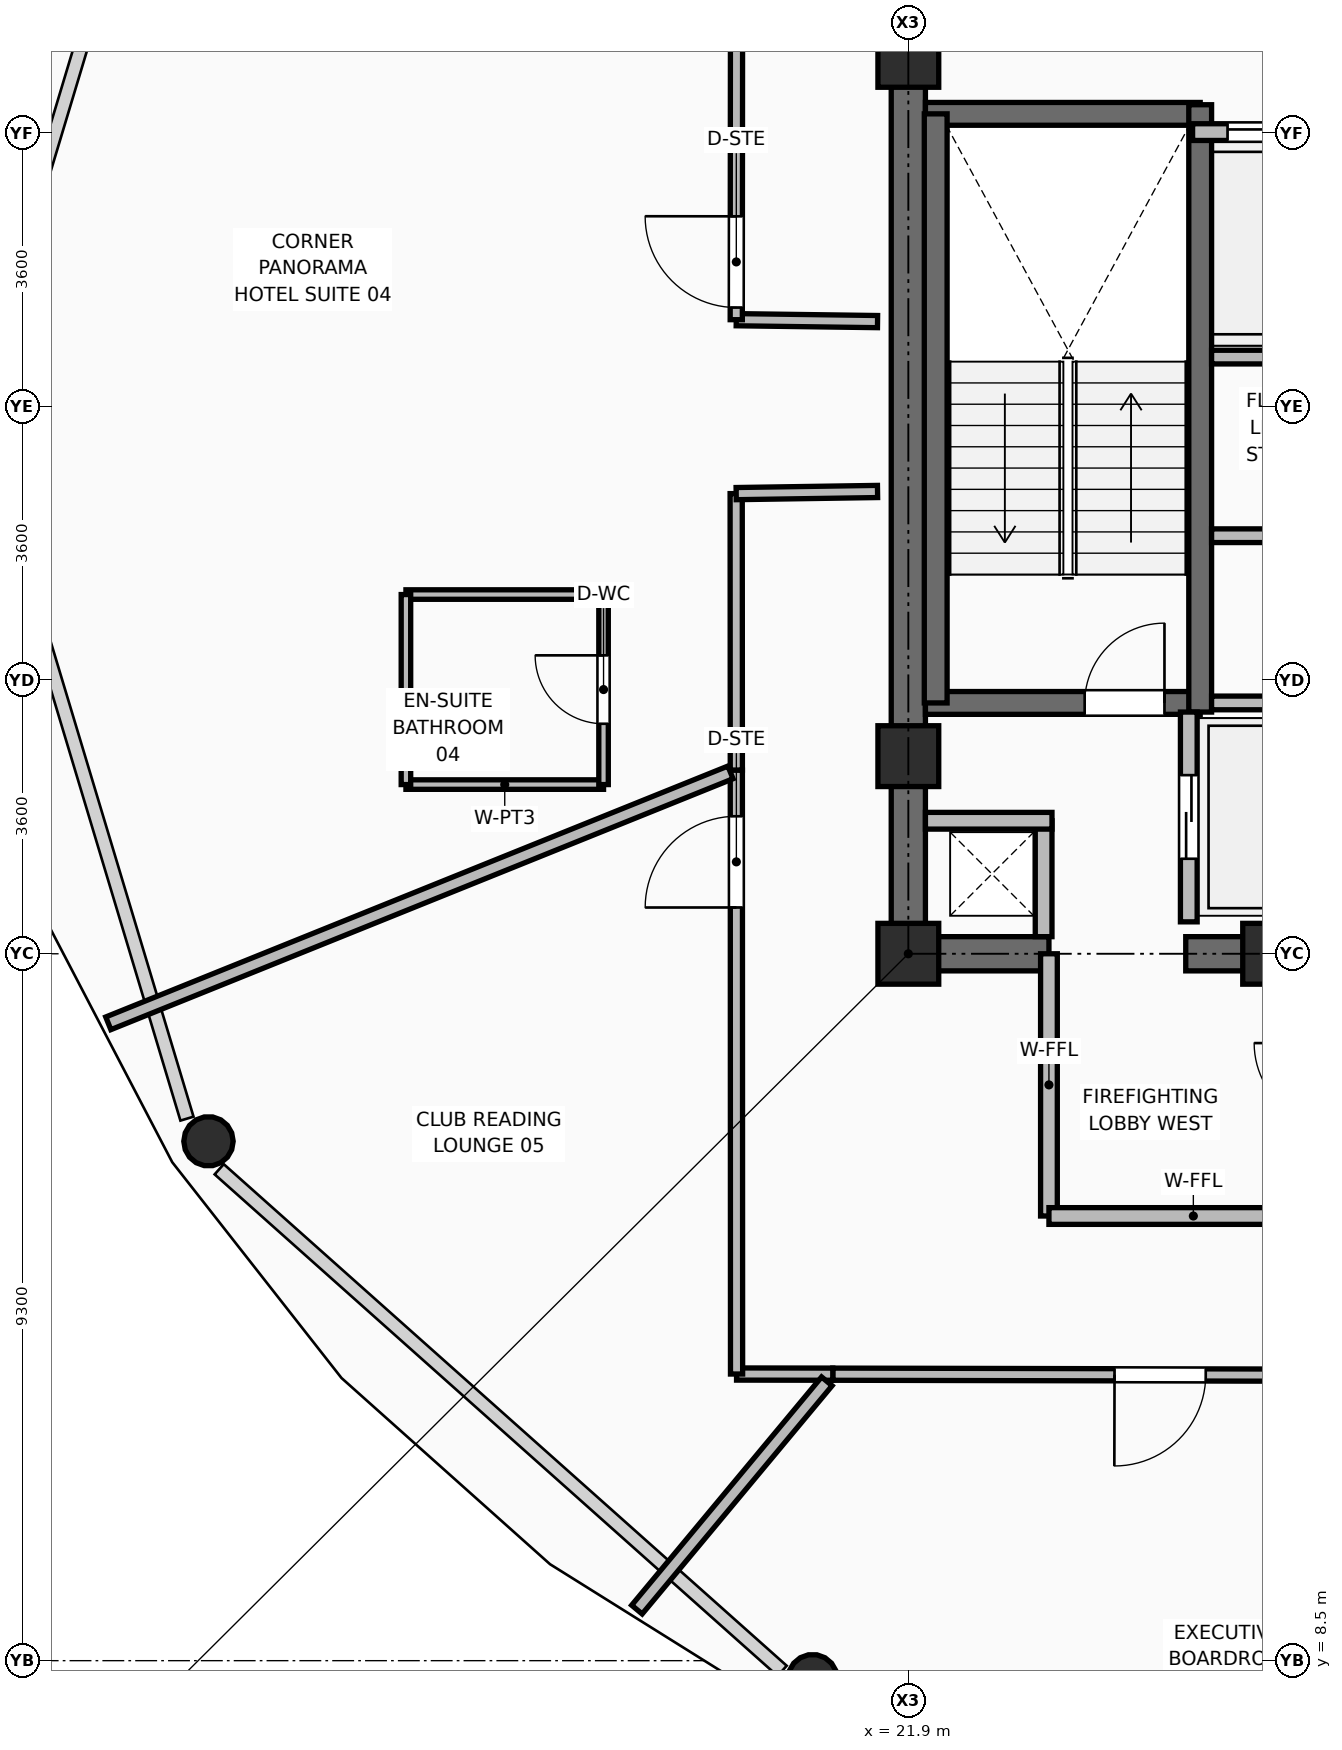
"""IFC4 building model, lengths in metres.
Left out: names, types, materials, properties, quantities, classifications, styles, units other than length and angle.
Written with IfcOpenShell. Run it as: python <this file> out.ifc"""

import sys

from ifc_helpers import new_model, si_unit, direction, frame, frame_2d, origin, origin_2d, place, context, subcontext, project, spatial, rectangle, hollow_circle, extrude, element, fill, save


model = new_model("IFC4")
c1 = context("Model", 3, precision=1e-05, world=origin(), true_north=direction((0.0, 1.0)))
c2 = subcontext(c1, "Body", "Model", "MODEL_VIEW")
j1 = project(units=[si_unit("LENGTHUNIT", "METRE"), si_unit("PLANEANGLEUNIT", "RADIAN")], contexts=[c1])
p1 = place(None, origin())
s1 = spatial("IfcSite", under=j1, at=p1, CompositionType="ELEMENT")
p2 = place(p1, origin())
s2 = spatial("IfcBuilding", under=s1, at=p2, CompositionType="ELEMENT")
p3 = place(p2, frame((0.0, 0.0, 242.4)))
s3 = spatial("IfcBuildingStorey", under=s2, at=p3, CompositionType="ELEMENT", Elevation=242.4)
for number, where, z_axis, x_axis in (
    (1, (21.9, 17.8, 0.0), (0.0, 0.0, 1.0), (1.0, 0.0, 0.0)),
    (2, (26.7, 17.8, 0.0), (0.0, 0.0, 1.0), (1.0, 0.0, 0.0)),
    (3, (21.9, 20.4, 0.0), (0.0, 0.0, 1.0), (1.0, 0.0, 0.0)),
    (4, (21.9, 29.6, 0.0), (0.0, 0.0, 1.0), (1.0, 0.0, 0.0)),
):
    element("IfcColumn", number, at=place(p3, frame(where, z_axis=z_axis, x_axis=x_axis)), inside=s3, PredefinedType="COLUMN", context=c2, shape_type="SweptSolid", body=[
        extrude(rectangle(XDim=0.8, YDim=0.8, at=origin_2d()), origin(), (0.0, 0.0, 1.0), 3.75),
    ])
for number, where, z_axis, x_axis in (
    (5, (12.692, 15.333, 0.0), (0.0, 0.0, 1.0), (1.0, 0.0, 0.0)),
    (6, (20.641, 8.257, 0.0), (0.0, 0.0, 1.0), (1.0, 0.0, 0.0)),
):
    element("IfcColumn", number, at=place(p3, frame(where, z_axis=z_axis, x_axis=x_axis)), inside=s3, PredefinedType="COLUMN", context=c2, shape_type="SweptSolid", body=[
        extrude(hollow_circle(Radius=0.325, WallThickness=0.03, at=origin_2d()), origin(), (0.0, 0.0, 1.0), 3.57),
    ])
p4 = place(p3, frame((21.675, 17.8, 0.0), z_axis=(0.0, 0.0, 1.0), x_axis=(1.0, 0.0, 0.0)))
e7 = element("IfcWall", 7, at=p4, inside=s3, PredefinedType="SHEAR", context=c2, shape_type="SweptSolid", body=[
    extrude(rectangle(XDim=2.075, YDim=0.45, at=frame_2d((1.038, 0.0))), origin(), (0.0, 0.0, 1.0), 3.57),
])
p5 = place(p3, frame((25.55, 17.8, 0.0), z_axis=(0.0, 0.0, 1.0), x_axis=(1.0, 0.0, 0.0)))
e8 = element("IfcWall", 8, at=p5, inside=s3, PredefinedType="SHEAR", context=c2, shape_type="SweptSolid", body=[
    extrude(rectangle(XDim=6.9, YDim=0.45, at=frame_2d((3.45, 0.0))), origin(), (0.0, 0.0, 1.0), 3.57),
])
p6 = place(p3, frame((21.9, 18.025, 0.0), z_axis=(0.0, 0.0, 1.0), x_axis=(0.0, 1.0, 0.0)))
e9 = element("IfcWall", 9, at=p6, inside=s3, PredefinedType="SHEAR", context=c2, shape_type="SweptSolid", body=[
    extrude(rectangle(XDim=14.2, YDim=0.45, at=frame_2d((7.1, 0.0))), origin(), (0.0, 0.0, 1.0), 3.57),
])
p7 = place(p3, frame((22.125, 21.1, 0.0), z_axis=(0.0, 0.0, 1.0), x_axis=(1.0, 0.0, 0.0)))
e10 = element("IfcWall", 10, at=p7, inside=s3, PredefinedType="SHEAR", context=c2, shape_type="SweptSolid", body=[
    extrude(rectangle(XDim=3.615, YDim=0.3, at=frame_2d((1.808, 0.0))), origin(), (0.0, 0.0, 1.0), 3.57),
])
p8 = place(p7, frame((2.095, 0.0, 0.0)))
e11 = element("IfcOpeningElement", 11, at=p8, cuts=e10, PredefinedType="OPENING", context=c2, shape_type="SweptSolid", body=[
    extrude(rectangle(XDim=1.05, YDim=2.1, at=frame_2d((0.525, 1.05))), frame((0.0, 0.16, 0.0), z_axis=(0.0, -1.0, 0.0), x_axis=(1.0, 0.0, 0.0)), (0.0, 0.0, 1.0), 0.32),
])
p9 = place(p3, frame((22.125, 28.85, 0.0), z_axis=(0.0, 0.0, 1.0), x_axis=(1.0, 0.0, 0.0)))
e12 = element("IfcWall", 12, at=p9, inside=s3, PredefinedType="SHEAR", context=c2, shape_type="SweptSolid", body=[
    extrude(rectangle(XDim=3.615, YDim=0.3, at=frame_2d((1.808, 0.0))), origin(), (0.0, 0.0, 1.0), 3.57),
])
p10 = place(p3, frame((25.74, 20.98, 0.0), z_axis=(0.0, 0.0, 1.0), x_axis=(0.0, 1.0, 0.0)))
e13 = element("IfcWall", 13, at=p10, inside=s3, PredefinedType="SHEAR", context=c2, shape_type="SweptSolid", body=[
    extrude(rectangle(XDim=7.99, YDim=0.3, at=frame_2d((3.995, 0.0))), origin(), (0.0, 0.0, 1.0), 3.57),
])
p11 = place(p3, frame((22.26, 21.1, 0.0), z_axis=(0.0, 0.0, 1.0), x_axis=(0.0, 1.0, 0.0)))
e14 = element("IfcWall", 14, at=p11, inside=s3, PredefinedType="SHEAR", context=c2, shape_type="SweptSolid", body=[
    extrude(rectangle(XDim=7.75, YDim=0.3, at=frame_2d((3.875, 0.0))), origin(), (0.0, 0.0, 1.0), 3.57),
])
p12 = place(p3, frame((23.68, 18.025, 0.0), z_axis=(0.0, 0.0, 1.0), x_axis=(0.0, 1.0, 0.0)))
e15 = element("IfcWall", 15, at=p12, inside=s3, PredefinedType="PARTITIONING", context=c2, shape_type="SweptSolid", body=[
    extrude(rectangle(XDim=1.525, YDim=0.22, at=frame_2d((0.763, 0.0))), origin(), (0.0, 0.0, 1.0), 3.55),
])
p13 = place(p3, frame((22.125, 19.55, 0.0), z_axis=(0.0, 0.0, 1.0), x_axis=(1.0, 0.0, 0.0)))
e16 = element("IfcWall", 16, at=p13, inside=s3, PredefinedType="PARTITIONING", context=c2, shape_type="SweptSolid", body=[
    extrude(rectangle(XDim=1.665, YDim=0.22, at=frame_2d((0.833, 0.0))), origin(), (0.0, 0.0, 1.0), 2.595),
])
p14 = place(p3, frame((25.59, 18.22, 0.0), z_axis=(0.0, 0.0, 1.0), x_axis=(0.0, 1.0, 0.0)))
e17 = element("IfcWall", 17, at=p14, inside=s3, PredefinedType="PARTITIONING", context=c2, shape_type="SweptSolid", body=[
    extrude(rectangle(XDim=2.76, YDim=0.22, at=frame_2d((1.38, 0.0))), origin(), (0.0, 0.0, 1.0), 3.55),
])
p15 = place(p14, frame((0.83, 0.0, 0.0)))
e18 = element("IfcOpeningElement", 18, at=p15, cuts=e17, PredefinedType="OPENING", context=c2, shape_type="SweptSolid", body=[
    extrude(rectangle(XDim=1.1, YDim=2.2, at=frame_2d((0.55, 1.1))), frame((0.0, 0.12, 0.0), z_axis=(0.0, -1.0, 0.0), x_axis=(1.0, 0.0, 0.0)), (0.0, 0.0, 1.0), 0.24),
])
p16 = place(p3, frame((25.64, 28.61, 0.0), z_axis=(0.0, 0.0, 1.0), x_axis=(1.0, 0.0, 0.0)))
e19 = element("IfcWall", 19, at=p16, inside=s3, PredefinedType="PARTITIONING", context=c2, shape_type="SweptSolid", body=[
    extrude(rectangle(XDim=2.02, YDim=0.22, at=frame_2d((1.01, 0.0))), origin(), (0.0, 0.0, 1.0), 3.55),
])
p17 = place(p16, frame((0.46, 0.0, 0.0)))
e20 = element("IfcOpeningElement", 20, at=p17, cuts=e19, PredefinedType="OPENING", context=c2, shape_type="SweptSolid", body=[
    extrude(rectangle(XDim=1.1, YDim=2.2, at=frame_2d((0.55, 1.1))), frame((0.0, 0.12, 0.0), z_axis=(0.0, -1.0, 0.0), x_axis=(1.0, 0.0, 0.0)), (0.0, 0.0, 1.0), 0.24),
])
for number, where, z_axis, x_axis in (
    (21, (25.89, 21.1, 0.0), (0.0, 0.0, 1.0), (1.0, 0.0, 0.0)),
    (22, (25.89, 25.65, 0.0), (0.0, 0.0, 1.0), (1.0, 0.0, 0.0)),
):
    element("IfcWall", number, at=place(p3, frame(where, z_axis=z_axis, x_axis=x_axis)), inside=s3, PredefinedType="PARTITIONING", context=c2, shape_type="SweptSolid", body=[
        extrude(rectangle(XDim=1.7, YDim=0.18, at=frame_2d((0.85, 0.0))), origin(), (0.0, 0.0, 1.0), 3.55),
    ])
p18 = place(p3, frame((25.89, 23.3, 0.0), z_axis=(0.0, 0.0, 1.0), x_axis=(1.0, 0.0, 0.0)))
e23 = element("IfcWall", 23, at=p18, inside=s3, PredefinedType="PARTITIONING", context=c2, shape_type="SweptSolid", body=[
    extrude(rectangle(XDim=1.79, YDim=0.18, at=frame_2d((0.895, 0.0))), origin(), (0.0, 0.0, 1.0), 3.55),
])
p19 = place(p3, frame((23.75, 14.35, 0.0), z_axis=(0.0, 0.0, 1.0), x_axis=(0.0, 1.0, 0.0)))
e24 = element("IfcWall", 24, at=p19, inside=s3, PredefinedType="PARTITIONING", context=c2, shape_type="SweptSolid", body=[
    extrude(rectangle(XDim=3.45, YDim=0.22, at=frame_2d((1.725, 0.0))), origin(), (0.0, 0.0, 1.0), 3.081),
])
p20 = place(p3, frame((23.75, 14.35, 0.0), z_axis=(0.0, 0.0, 1.0), x_axis=(1.0, 0.0, 0.0)))
e25 = element("IfcWall", 25, at=p20, inside=s3, PredefinedType="PARTITIONING", context=c2, shape_type="SweptSolid", body=[
    extrude(rectangle(XDim=3.8, YDim=0.22, at=frame_2d((1.9, 0.0))), origin(), (0.0, 0.0, 1.0), 3.55),
])
p21 = place(p3, frame((21.495, 26.117, 0.0), z_axis=(0.0, 0.0, 1.0), x_axis=(-0.999908537082, 0.013524698532, 0.0)))
e26 = element("IfcWall", 26, at=p21, inside=s3, PredefinedType="PARTITIONING", context=c2, shape_type="SweptSolid", body=[
    extrude(rectangle(XDim=1.859, YDim=0.16, at=frame_2d((0.93, 0.0))), origin(), (0.0, 0.0, 1.0), 2.595),
])
p22 = place(p3, frame((19.636, 26.142, 0.0), z_axis=(0.0, 0.0, 1.0), x_axis=(0.000920648448, 0.999999576203, 0.0)))
e27 = element("IfcWall", 27, at=p22, inside=s3, PredefinedType="PARTITIONING", context=c2, shape_type="SweptSolid", body=[
    extrude(rectangle(XDim=5.569, YDim=0.16, at=frame_2d((2.784, 0.0))), origin(), (0.0, 0.0, 1.0), 3.55),
])
p23 = place(p22, frame((0.16, 0.0, 0.0)))
e28 = element("IfcOpeningElement", 28, at=p23, cuts=e27, PredefinedType="OPENING", context=c2, shape_type="SweptSolid", body=[
    extrude(rectangle(XDim=1.2, YDim=2.1, at=frame_2d((0.6, 1.05))), frame((0.0, 0.09, 0.0), z_axis=(0.0, -1.0, 0.0), x_axis=(1.0, 0.0, 0.0)), (0.0, 0.0, 1.0), 0.18),
])
p24 = place(p3, frame((29.521, 12.251, 0.0), z_axis=(0.0, 0.0, 1.0), x_axis=(-0.999997801115, 0.002097084968, 0.0)))
e29 = element("IfcWall", 29, at=p24, inside=s3, PredefinedType="PARTITIONING", context=c2, shape_type="SweptSolid", body=[
    extrude(rectangle(XDim=8.615, YDim=0.16, at=frame_2d((4.308, 0.0))), origin(), (0.0, 0.0, 1.0), 3.081),
])
p25 = place(p24, frame((3.708, 0.0, 0.0)))
e30 = element("IfcOpeningElement", 30, at=p25, cuts=e29, PredefinedType="OPENING", context=c2, shape_type="SweptSolid", body=[
    extrude(rectangle(XDim=1.2, YDim=2.1, at=frame_2d((0.6, 1.05))), frame((0.0, 0.09, 0.0), z_axis=(0.0, -1.0, 0.0), x_axis=(1.0, 0.0, 0.0)), (0.0, 0.0, 1.0), 0.18),
])
p26 = place(p3, frame((20.906, 12.269, 0.0), z_axis=(0.0, 0.0, 1.0), x_axis=(-0.999998810172, 0.001542612897, 0.0)))
e31 = element("IfcWall", 31, at=p26, inside=s3, PredefinedType="PARTITIONING", context=c2, shape_type="SweptSolid", body=[
    extrude(rectangle(XDim=1.266, YDim=0.16, at=frame_2d((0.633, 0.0))), origin(), (0.0, 0.0, 1.0), 3.55),
])
p27 = place(p3, frame((19.64, 12.271, 0.0), z_axis=(0.0, 0.0, 1.0), x_axis=(-0.000368697551, 0.999999932031, 0.0)))
e32 = element("IfcWall", 32, at=p27, inside=s3, PredefinedType="PARTITIONING", context=c2, shape_type="SweptSolid", body=[
    extrude(rectangle(XDim=7.946, YDim=0.16, at=frame_2d((3.973, 0.0))), origin(), (0.0, 0.0, 1.0), 3.081),
])
p28 = place(p27, frame((6.138, 0.0, 0.0)))
e33 = element("IfcOpeningElement", 33, at=p28, cuts=e32, PredefinedType="OPENING", context=c2, shape_type="SweptSolid", body=[
    extrude(rectangle(XDim=1.2, YDim=2.1, at=frame_2d((0.6, 1.05))), frame((0.0, 0.09, 0.0), z_axis=(0.0, -1.0, 0.0), x_axis=(1.0, 0.0, 0.0)), (0.0, 0.0, 1.0), 0.18),
])
p29 = place(p3, frame((19.637, 20.217, 0.0), z_axis=(0.0, 0.0, 1.0), x_axis=(-0.000537020799, 0.999999855804, 0.0)))
e34 = element("IfcWall", 34, at=p29, inside=s3, PredefinedType="PARTITIONING", context=c2, shape_type="SweptSolid", body=[
    extrude(rectangle(XDim=3.637, YDim=0.16, at=frame_2d((1.818, 0.0))), origin(), (0.0, 0.0, 1.0), 3.081),
])
p30 = place(p3, frame((19.635, 23.854, 0.0), z_axis=(0.0, 0.0, 1.0), x_axis=(0.999886107392, 0.015092125259, 0.0)))
e35 = element("IfcWall", 35, at=p30, inside=s3, PredefinedType="PARTITIONING", context=c2, shape_type="SweptSolid", body=[
    extrude(rectangle(XDim=1.86, YDim=0.16, at=frame_2d((0.93, 0.0))), origin(), (0.0, 0.0, 1.0), 2.595),
])
p31 = place(p3, frame((19.56, 20.186, 0.0), z_axis=(0.0, 0.0, 1.0), x_axis=(-0.927433425778, -0.37398828959, 0.0)))
e36 = element("IfcWall", 36, at=p31, inside=s3, PredefinedType="PARTITIONING", context=c2, shape_type="SweptSolid", body=[
    extrude(rectangle(XDim=8.827, YDim=0.18, at=frame_2d((4.413, 0.0))), origin(), (0.0, 0.0, 1.0), 2.925),
])
p32 = place(p3, frame((20.828, 12.175, 0.0), z_axis=(0.0, 0.0, 1.0), x_axis=(-0.639631003839, -0.768682105248, 0.0)))
e37 = element("IfcWall", 37, at=p32, inside=s3, PredefinedType="PARTITIONING", context=c2, shape_type="SweptSolid", body=[
    extrude(rectangle(XDim=3.906, YDim=0.18, at=frame_2d((1.953, 0.0))), origin(), (0.0, 0.0, 1.0), 2.925),
])
p33 = place(p3, frame((15.29, 20.026, 0.0), z_axis=(0.0, 0.0, 1.0), x_axis=(1.0, 0.0, 0.0)))
e38 = element("IfcWall", 38, at=p33, inside=s3, PredefinedType="PARTITIONING", context=c2, shape_type="SweptSolid", body=[
    extrude(rectangle(XDim=2.6, YDim=0.125, at=frame_2d((1.3, 0.0))), origin(), (0.0, 0.0, 1.0), 3.55),
])
p34 = place(p3, frame((15.29, 22.526, 0.0), z_axis=(0.0, 0.0, 1.0), x_axis=(1.0, 0.0, 0.0)))
e39 = element("IfcWall", 39, at=p34, inside=s3, PredefinedType="PARTITIONING", context=c2, shape_type="SweptSolid", body=[
    extrude(rectangle(XDim=2.6, YDim=0.125, at=frame_2d((1.3, 0.0))), origin(), (0.0, 0.0, 1.0), 3.081),
])
p35 = place(p3, frame((15.29, 20.026, 0.0), z_axis=(0.0, 0.0, 1.0), x_axis=(0.0, 1.0, 0.0)))
e40 = element("IfcWall", 40, at=p35, inside=s3, PredefinedType="PARTITIONING", context=c2, shape_type="SweptSolid", body=[
    extrude(rectangle(XDim=2.5, YDim=0.125, at=frame_2d((1.25, 0.0))), origin(), (0.0, 0.0, 1.0), 3.55),
])
p36 = place(p3, frame((17.89, 20.026, 0.0), z_axis=(0.0, 0.0, 1.0), x_axis=(0.0, 1.0, 0.0)))
e41 = element("IfcWall", 41, at=p36, inside=s3, PredefinedType="PARTITIONING", context=c2, shape_type="SweptSolid", body=[
    extrude(rectangle(XDim=2.5, YDim=0.125, at=frame_2d((1.25, 0.0))), origin(), (0.0, 0.0, 1.0), 3.081),
])
p37 = place(p36, frame((0.8, 0.0, 0.0)))
e42 = element("IfcOpeningElement", 42, at=p37, cuts=e41, PredefinedType="OPENING", context=c2, shape_type="SweptSolid", body=[
    extrude(rectangle(XDim=0.9, YDim=2.1, at=frame_2d((0.45, 1.05))), frame((0.0, 0.073, 0.0), z_axis=(0.0, -1.0, 0.0), x_axis=(1.0, 0.0, 0.0)), (0.0, 0.0, 1.0), 0.145),
])
p38 = place(p8, origin())
e43 = element("IfcDoor", 43, at=p38, inside=s3, OperationType="SINGLE_SWING_RIGHT", PredefinedType="DOOR", context=c2, shape_type="SweptSolid", body=[
    extrude(rectangle(XDim=1.05, YDim=2.1, at=frame_2d((0.525, 1.05))), frame((0.0, 0.025, 0.0), z_axis=(0.0, -1.0, 0.0), x_axis=(1.0, 0.0, 0.0)), (0.0, 0.0, 1.0), 0.05),
])
fill(e11, e43)
p39 = place(p15, origin())
e44 = element("IfcDoor", 44, at=p39, inside=s3, OperationType="DOUBLE_DOOR_SLIDING", PredefinedType="DOOR", context=c2, shape_type="SweptSolid", body=[
    extrude(rectangle(XDim=1.1, YDim=2.2, at=frame_2d((0.55, 1.1))), frame((0.0, 0.025, 0.0), z_axis=(0.0, -1.0, 0.0), x_axis=(1.0, 0.0, 0.0)), (0.0, 0.0, 1.0), 0.05),
])
fill(e18, e44)
p40 = place(p17, origin())
e45 = element("IfcDoor", 45, at=p40, inside=s3, OperationType="DOUBLE_DOOR_SLIDING", PredefinedType="DOOR", context=c2, shape_type="SweptSolid", body=[
    extrude(rectangle(XDim=1.1, YDim=2.2, at=frame_2d((0.55, 1.1))), frame((0.0, 0.025, 0.0), z_axis=(0.0, -1.0, 0.0), x_axis=(1.0, 0.0, 0.0)), (0.0, 0.0, 1.0), 0.05),
])
fill(e20, e45)
p41 = place(p37, origin())
e46 = element("IfcDoor", 46, at=p41, inside=s3, OperationType="SINGLE_SWING_RIGHT", PredefinedType="DOOR", context=c2, shape_type="SweptSolid", body=[
    extrude(rectangle(XDim=0.9, YDim=2.1, at=frame_2d((0.45, 1.05))), frame((0.0, 0.025, 0.0), z_axis=(0.0, -1.0, 0.0), x_axis=(1.0, 0.0, 0.0)), (0.0, 0.0, 1.0), 0.05),
])
fill(e42, e46)
p42 = place(p23, origin())
e47 = element("IfcDoor", 47, at=p42, inside=s3, OperationType="SINGLE_SWING_RIGHT", PredefinedType="DOOR", context=c2, shape_type="SweptSolid", body=[
    extrude(rectangle(XDim=1.2, YDim=2.1, at=frame_2d((0.6, 1.05))), frame((0.0, 0.025, 0.0), z_axis=(0.0, -1.0, 0.0), x_axis=(1.0, 0.0, 0.0)), (0.0, 0.0, 1.0), 0.05),
])
fill(e28, e47)
p43 = place(p28, origin())
e48 = element("IfcDoor", 48, at=p43, inside=s3, OperationType="SINGLE_SWING_LEFT", PredefinedType="DOOR", context=c2, shape_type="SweptSolid", body=[
    extrude(rectangle(XDim=1.2, YDim=2.1, at=frame_2d((0.6, 1.05))), frame((0.0, 0.025, 0.0), z_axis=(0.0, -1.0, 0.0), x_axis=(1.0, 0.0, 0.0)), (0.0, 0.0, 1.0), 0.05),
])
fill(e33, e48)
p44 = place(p25, origin())
e49 = element("IfcDoor", 49, at=p44, inside=s3, OperationType="SINGLE_SWING_RIGHT", PredefinedType="DOOR", context=c2, shape_type="SweptSolid", body=[
    extrude(rectangle(XDim=1.2, YDim=2.1, at=frame_2d((0.6, 1.05))), frame((0.0, 0.025, 0.0), z_axis=(0.0, -1.0, 0.0), x_axis=(1.0, 0.0, 0.0)), (0.0, 0.0, 1.0), 0.05),
])
fill(e30, e49)
save(model, sys.argv[1])
